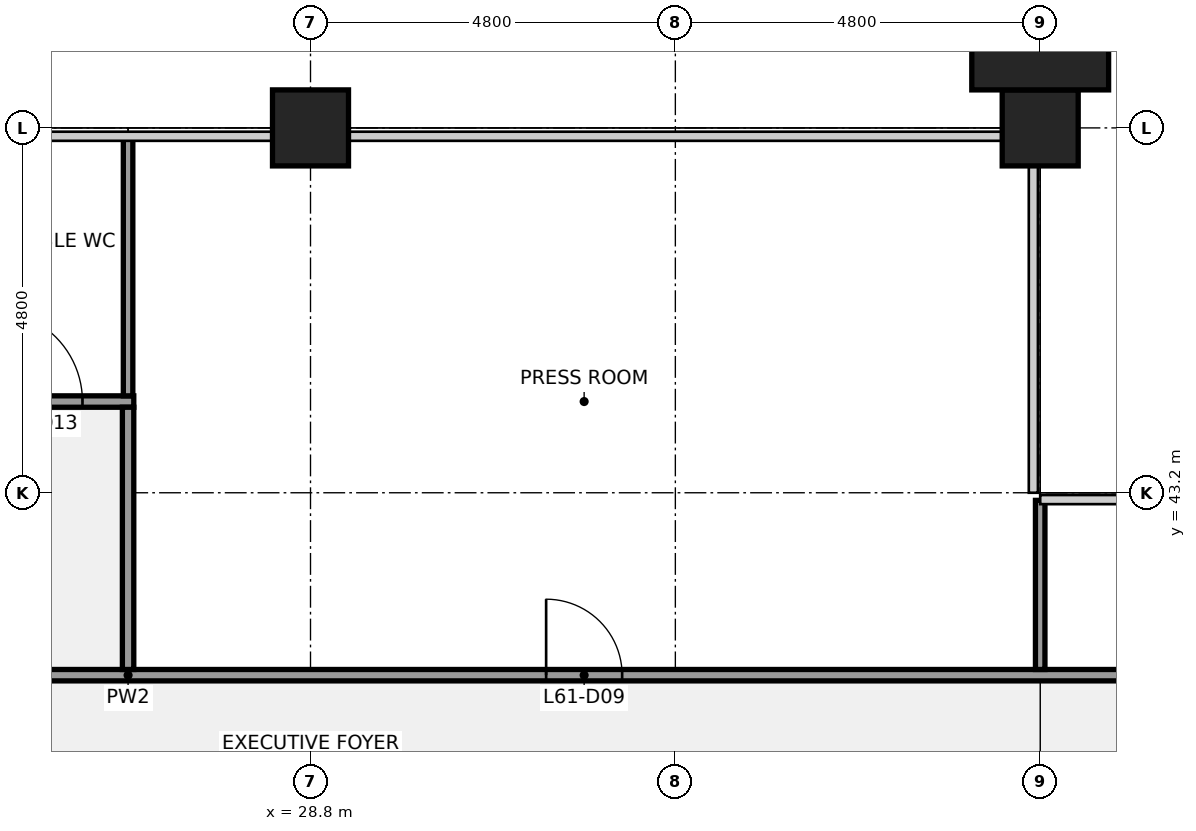
"""IFC4 building model, lengths in metres.
Left out: names, types, materials, properties, quantities, classifications, styles, units other than length and angle.
Written with IfcOpenShell. Run it as: python <this file> out.ifc"""

import sys

from ifc_helpers import new_model, si_unit, direction, frame, frame_2d, origin, origin_2d, place, context, subcontext, project, spatial, rectangle, extrude, element, fill, save


model = new_model("IFC4")
c1 = context("Model", 3, precision=1e-05, world=origin(), true_north=direction((0.0, 1.0)))
c2 = subcontext(c1, "Body", "Model", "MODEL_VIEW")
j1 = project(units=[si_unit("LENGTHUNIT", "METRE"), si_unit("PLANEANGLEUNIT", "RADIAN")], contexts=[c1])
p1 = place(None, origin())
s1 = spatial("IfcSite", under=j1, at=p1, CompositionType="ELEMENT")
p2 = place(p1, origin())
s2 = spatial("IfcBuilding", under=s1, at=p2, CompositionType="ELEMENT")
p3 = place(p2, frame((0.0, 0.0, 282.3)))
s3 = spatial("IfcBuildingStorey", under=s2, at=p3, CompositionType="ELEMENT", Elevation=282.3)
for number, where, z_axis, x_axis in (
    (1, (28.8, 48.0, 0.0), (0.0, 0.0, 1.0), (1.0, 0.0, 0.0)),
    (2, (38.4, 48.0, 0.0), (0.0, 0.0, 1.0), (1.0, 0.0, 0.0)),
):
    element("IfcColumn", number, at=place(p3, frame(where, z_axis=z_axis, x_axis=x_axis)), inside=s3, PredefinedType="COLUMN", context=c2, shape_type="SweptSolid", body=[
        extrude(rectangle(XDim=1.0, YDim=1.0, at=origin_2d()), origin(), (0.0, 0.0, 1.0), 4.0),
    ])
p4 = place(p3, frame((9.7, 40.8, 0.0), z_axis=(0.0, 0.0, 1.0), x_axis=(1.0, 0.0, 0.0)))
e3 = element("IfcWall", 3, at=p4, inside=s3, PredefinedType="PARTITIONING", context=c2, shape_type="SweptSolid", body=[
    extrude(rectangle(XDim=33.4, YDim=0.15, at=frame_2d((16.7, 0.0))), origin(), (0.0, 0.0, 1.0), 2.87),
])
p5 = place(p4, frame((4.25, 0.0, 0.0)))
e4 = element("IfcOpeningElement", 4, at=p5, cuts=e3, PredefinedType="OPENING", context=c2, shape_type="SweptSolid", body=[
    extrude(rectangle(XDim=1.0, YDim=2.1, at=frame_2d((0.5, 1.05))), frame((0.0, 0.085, 0.0), z_axis=(0.0, -1.0, 0.0), x_axis=(1.0, 0.0, 0.0)), (0.0, 0.0, 1.0), 0.17),
])
p6 = place(p4, frame((12.6, 0.0, 0.0)))
e5 = element("IfcOpeningElement", 5, at=p6, cuts=e3, PredefinedType="OPENING", context=c2, shape_type="SweptSolid", body=[
    extrude(rectangle(XDim=1.0, YDim=2.1, at=frame_2d((0.5, 1.05))), frame((0.0, 0.085, 0.0), z_axis=(0.0, -1.0, 0.0), x_axis=(1.0, 0.0, 0.0)), (0.0, 0.0, 1.0), 0.17),
])
p7 = place(p4, frame((22.2, 0.0, 0.0)))
e6 = element("IfcOpeningElement", 6, at=p7, cuts=e3, PredefinedType="OPENING", context=c2, shape_type="SweptSolid", body=[
    extrude(rectangle(XDim=1.0, YDim=2.1, at=frame_2d((0.5, 1.05))), frame((0.0, 0.085, 0.0), z_axis=(0.0, -1.0, 0.0), x_axis=(1.0, 0.0, 0.0)), (0.0, 0.0, 1.0), 0.17),
])
p8 = place(p4, frame((30.55, 0.0, 0.0)))
e7 = element("IfcOpeningElement", 7, at=p8, cuts=e3, PredefinedType="OPENING", context=c2, shape_type="SweptSolid", body=[
    extrude(rectangle(XDim=1.0, YDim=2.1, at=frame_2d((0.5, 1.05))), frame((0.0, 0.085, 0.0), z_axis=(0.0, -1.0, 0.0), x_axis=(1.0, 0.0, 0.0)), (0.0, 0.0, 1.0), 0.17),
])
p9 = place(p3, frame((19.3, 44.4, 0.0), z_axis=(0.0, 0.0, 1.0), x_axis=(1.0, 0.0, 0.0)))
e8 = element("IfcWall", 8, at=p9, inside=s3, PredefinedType="PARTITIONING", context=c2, shape_type="SweptSolid", body=[
    extrude(rectangle(XDim=7.175, YDim=0.15, at=frame_2d((3.587, 0.0))), origin(), (0.0, 0.0, 1.0), 2.87),
])
p10 = place(p9, frame((0.7, 0.0, 0.0)))
e9 = element("IfcOpeningElement", 9, at=p10, cuts=e8, PredefinedType="OPENING", context=c2, shape_type="SweptSolid", body=[
    extrude(rectangle(XDim=0.9, YDim=2.1, at=frame_2d((0.45, 1.05))), frame((0.0, 0.085, 0.0), z_axis=(0.0, -1.0, 0.0), x_axis=(1.0, 0.0, 0.0)), (0.0, 0.0, 1.0), 0.17),
])
p11 = place(p9, frame((3.05, 0.0, 0.0)))
e10 = element("IfcOpeningElement", 10, at=p11, cuts=e8, PredefinedType="OPENING", context=c2, shape_type="SweptSolid", body=[
    extrude(rectangle(XDim=0.9, YDim=2.1, at=frame_2d((0.45, 1.05))), frame((0.0, 0.085, 0.0), z_axis=(0.0, -1.0, 0.0), x_axis=(1.0, 0.0, 0.0)), (0.0, 0.0, 1.0), 0.17),
])
p12 = place(p9, frame((5.3, 0.0, 0.0)))
e11 = element("IfcOpeningElement", 11, at=p12, cuts=e8, PredefinedType="OPENING", context=c2, shape_type="SweptSolid", body=[
    extrude(rectangle(XDim=1.2, YDim=2.1, at=frame_2d((0.6, 1.05))), frame((0.0, 0.085, 0.0), z_axis=(0.0, -1.0, 0.0), x_axis=(1.0, 0.0, 0.0)), (0.0, 0.0, 1.0), 0.17),
])
p13 = place(p3, frame((26.4, 44.475, 0.0), z_axis=(0.0, 0.0, 1.0), x_axis=(0.0, 1.0, 0.0)))
e12 = element("IfcWall", 12, at=p13, inside=s3, PredefinedType="PARTITIONING", context=c2, shape_type="SweptSolid", body=[
    extrude(rectangle(XDim=3.425, YDim=0.125, at=frame_2d((1.712, 0.0))), origin(), (0.0, 0.0, 1.0), 2.87),
])
p14 = place(p3, frame((26.4, 40.875, 0.0), z_axis=(0.0, 0.0, 1.0), x_axis=(0.0, 1.0, 0.0)))
e13 = element("IfcWall", 13, at=p14, inside=s3, PredefinedType="PARTITIONING", context=c2, shape_type="SweptSolid", body=[
    extrude(rectangle(XDim=3.45, YDim=0.15, at=frame_2d((1.725, 0.0))), origin(), (0.0, 0.0, 1.0), 2.87),
])
p15 = place(p3, frame((38.4, 40.875, 0.0), z_axis=(0.0, 0.0, 1.0), x_axis=(0.0, 1.0, 0.0)))
e14 = element("IfcWall", 14, at=p15, inside=s3, PredefinedType="PARTITIONING", context=c2, shape_type="SweptSolid", body=[
    extrude(rectangle(XDim=2.225, YDim=0.125, at=frame_2d((1.113, 0.0))), origin(), (0.0, 0.0, 1.0), 2.87),
])
p16 = place(p3, frame((38.4, 49.0, 0.0), z_axis=(0.0, 0.0, 1.0), x_axis=(1.0, 0.0, 0.0)))
e15 = element("IfcColumn", 15, at=p16, inside=s3, PredefinedType="PILASTER", context=c2, shape_type="SweptSolid", body=[
    extrude(rectangle(XDim=1.8, YDim=1.0, at=origin_2d()), origin(), (0.0, 0.0, 1.0), 4.0),
])
p17 = place(p7, origin())
e16 = element("IfcDoor", 16, at=p17, inside=s3, OperationType="SINGLE_SWING_LEFT", PredefinedType="DOOR", context=c2, shape_type="SweptSolid", body=[
    extrude(rectangle(XDim=1.0, YDim=2.1, at=frame_2d((0.5, 1.05))), frame((0.0, 0.025, 0.0), z_axis=(0.0, -1.0, 0.0), x_axis=(1.0, 0.0, 0.0)), (0.0, 0.0, 1.0), 0.05),
])
fill(e6, e16)
p18 = place(p12, origin())
e17 = element("IfcDoor", 17, at=p18, inside=s3, OperationType="SINGLE_SWING_LEFT", PredefinedType="DOOR", context=c2, shape_type="SweptSolid", body=[
    extrude(rectangle(XDim=1.2, YDim=2.1, at=frame_2d((0.6, 1.05))), frame((0.0, 0.025, 0.0), z_axis=(0.0, -1.0, 0.0), x_axis=(1.0, 0.0, 0.0)), (0.0, 0.0, 1.0), 0.05),
])
fill(e11, e17)
save(model, sys.argv[1])
